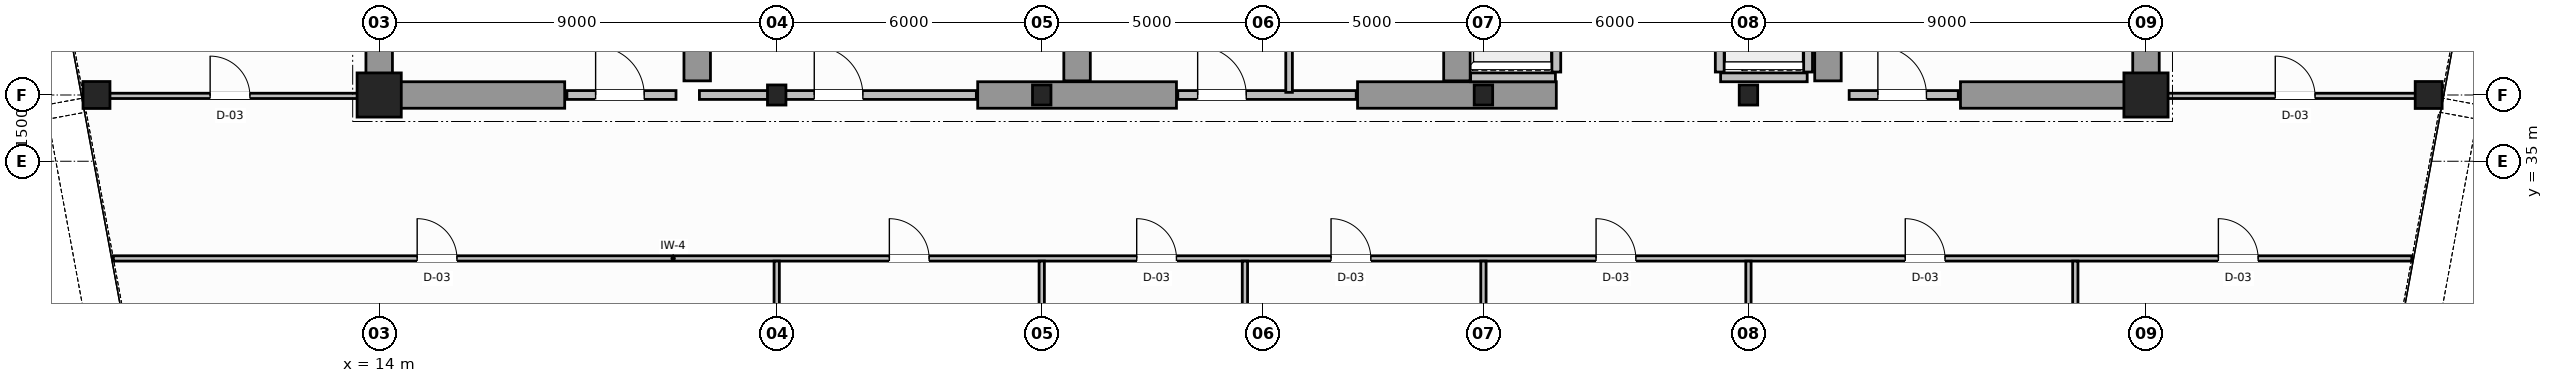
"""IFC4 building model, lengths in metres.
Left out: names, types, materials, properties, quantities, classifications, styles, units other than length and angle.
Written with IfcOpenShell. Run it as: python <this file> out.ifc"""

import sys

from ifc_helpers import new_model, si_unit, direction, frame, frame_2d, origin, origin_2d, place, context, subcontext, project, spatial, rectangle, hollow_circle, i_section, extrude, source, transform, mapped, element, fill, save


model = new_model("IFC4")
c1 = context("Model", 3, precision=1e-05, world=origin(), true_north=direction((0.0, 1.0)))
c2 = subcontext(c1, "Body", "Model", "MODEL_VIEW")
j1 = project(units=[si_unit("LENGTHUNIT", "METRE"), si_unit("PLANEANGLEUNIT", "RADIAN")], contexts=[c1])
p1 = place(None, origin())
s1 = spatial("IfcSite", under=j1, at=p1, CompositionType="ELEMENT")
p2 = place(p1, origin())
s2 = spatial("IfcBuilding", under=s1, at=p2, CompositionType="ELEMENT")
p3 = place(p2, frame((0.0, 0.0, 234.6)))
s3 = spatial("IfcBuildingStorey", under=s2, at=p3, CompositionType="ELEMENT", Elevation=234.6)
m1 = source(origin(), c2, "Body", "SweptSolid", [
    extrude(rectangle(XDim=1.0, YDim=1.0, at=origin_2d()), origin(), (0.0, 0.0, 1.0), 3.8),
])
p4 = place(p3, frame((14.0, 36.5, 0.0), z_axis=(0.0, 0.0, 1.0), x_axis=(1.0, 0.0, 0.0)))
e1 = element("IfcColumn", 1, at=p4, inside=s3, PredefinedType="COLUMN", context=c2, shape_type="MappedRepresentation", body=[
    mapped(m1, transform((0.0, 0.0, 0.0), scale=1.0)),
])
m2 = source(origin(), c2, "Body", "SweptSolid", [
    extrude(i_section(OverallWidth=0.418, OverallDepth=0.455, WebThickness=0.042, FlangeThickness=0.058, FilletRadius=0.015, at=origin_2d()), origin(), (0.0, 0.0, 1.0), 3.8),
])
for number, where, z_axis, x_axis in (
    (2, (23.0, 36.5, 0.0), (0.0, 0.0, 1.0), (1.0, 0.0, 0.0)),
    (3, (29.0, 36.5, 0.0), (0.0, 0.0, 1.0), (1.0, 0.0, 0.0)),
    (4, (39.0, 36.5, 0.0), (0.0, 0.0, 1.0), (1.0, 0.0, 0.0)),
    (5, (45.0, 36.5, 0.0), (0.0, 0.0, 1.0), (1.0, 0.0, 0.0)),
):
    element("IfcColumn", number, at=place(p3, frame(where, z_axis=z_axis, x_axis=x_axis)), inside=s3, PredefinedType="COLUMN", context=c2, shape_type="MappedRepresentation", body=[
        mapped(m2, transform((0.0, 0.0, 0.0), scale=1.0)),
    ])
p5 = place(p3, frame((54.0, 36.5, 0.0), z_axis=(0.0, 0.0, 1.0), x_axis=(1.0, 0.0, 0.0)))
e6 = element("IfcColumn", 6, at=p5, inside=s3, PredefinedType="COLUMN", context=c2, shape_type="MappedRepresentation", body=[
    mapped(m1, transform((0.0, 0.0, 0.0), scale=1.0)),
])
m3 = source(origin(), c2, "Body", "SweptSolid", [
    extrude(hollow_circle(Radius=0.305, WallThickness=0.03, at=origin_2d()), origin(), (0.0, 0.0, 1.0), 3.8),
])
for number, where, z_axis, x_axis in (
    (7, (7.6, 36.5, 0.0), (0.0, 0.0, 1.0), (1.0, 0.0, 0.0)),
    (8, (60.4, 36.5, 0.0), (0.0, 0.0, 1.0), (1.0, 0.0, 0.0)),
):
    element("IfcColumn", number, at=place(p3, frame(where, z_axis=z_axis, x_axis=x_axis)), inside=s3, PredefinedType="COLUMN", context=c2, shape_type="MappedRepresentation", body=[
        mapped(m3, transform((0.0, 0.0, 0.0), scale=1.0)),
    ])
for number, where, z_axis, x_axis in (
    (9, (14.0, 36.5, 0.0), (0.0, 0.0, 1.0), (0.0, 1.0, 0.0)),
    (10, (54.0, 36.5, 0.0), (0.0, 0.0, 1.0), (0.0, 1.0, 0.0)),
):
    element("IfcWall", number, at=place(p3, frame(where, z_axis=z_axis, x_axis=x_axis)), inside=s3, PredefinedType="SHEAR", context=c2, shape_type="SweptSolid", body=[
        extrude(rectangle(XDim=14.5, YDim=0.6, at=frame_2d((7.25, 0.0))), origin(), (0.0, 0.0, 1.0), 3.8),
    ])
p6 = place(p3, frame((14.32, 36.5, 0.0), z_axis=(0.0, 0.0, 1.0), x_axis=(1.0, 0.0, 0.0)))
e11 = element("IfcWall", 11, at=p6, inside=s3, PredefinedType="SHEAR", context=c2, shape_type="SweptSolid", body=[
    extrude(rectangle(XDim=3.88, YDim=0.6, at=frame_2d((1.94, 0.0))), origin(), (0.0, 0.0, 1.0), 2.58),
])
for number, where, z_axis, x_axis in (
    (12, (27.55, 36.5, 0.0), (0.0, 0.0, 1.0), (1.0, 0.0, 0.0)),
    (13, (36.15, 36.5, 0.0), (0.0, 0.0, 1.0), (1.0, 0.0, 0.0)),
):
    element("IfcWall", number, at=place(p3, frame(where, z_axis=z_axis, x_axis=x_axis)), inside=s3, PredefinedType="SHEAR", context=c2, shape_type="SweptSolid", body=[
        extrude(rectangle(XDim=4.5, YDim=0.6, at=frame_2d((2.25, 0.0))), origin(), (0.0, 0.0, 1.0), 3.8),
    ])
p7 = place(p3, frame((49.8, 36.5, 0.0), z_axis=(0.0, 0.0, 1.0), x_axis=(1.0, 0.0, 0.0)))
e14 = element("IfcWall", 14, at=p7, inside=s3, PredefinedType="SHEAR", context=c2, shape_type="SweptSolid", body=[
    extrude(rectangle(XDim=3.88, YDim=0.6, at=frame_2d((1.94, 0.0))), origin(), (0.0, 0.0, 1.0), 2.58),
])
for number, where, z_axis, x_axis in (
    (15, (21.2, 36.82, 0.0), (0.0, 0.0, 1.0), (0.0, 1.0, 0.0)),
    (16, (29.8, 36.82, 0.0), (0.0, 0.0, 1.0), (0.0, 1.0, 0.0)),
    (17, (38.4, 36.82, 0.0), (0.0, 0.0, 1.0), (0.0, 1.0, 0.0)),
    (18, (46.8, 36.82, 0.0), (0.0, 0.0, 1.0), (0.0, 1.0, 0.0)),
):
    element("IfcWall", number, at=place(p3, frame(where, z_axis=z_axis, x_axis=x_axis)), inside=s3, PredefinedType="SHEAR", context=c2, shape_type="SweptSolid", body=[
        extrude(rectangle(XDim=9.38, YDim=0.6, at=frame_2d((4.69, 0.0))), origin(), (0.0, 0.0, 1.0), 3.8),
    ])
p8 = place(p3, frame((18.25, 36.5, 0.0), z_axis=(0.0, 0.0, 1.0), x_axis=(1.0, 0.0, 0.0)))
e19 = element("IfcWall", 19, at=p8, inside=s3, PredefinedType="SOLIDWALL", context=c2, shape_type="SweptSolid", body=[
    extrude(rectangle(XDim=2.47, YDim=0.2, at=frame_2d((1.235, 0.0))), origin(), (0.0, 0.0, 1.0), 2.57),
])
p9 = place(p8, frame((0.65, 0.0, 0.0)))
e20 = element("IfcOpeningElement", 20, at=p9, cuts=e19, PredefinedType="OPENING", context=c2, shape_type="SweptSolid", body=[
    extrude(rectangle(XDim=1.1, YDim=2.15, at=frame_2d((0.55, 1.075))), frame((0.0, 0.11, 0.0), z_axis=(0.0, -1.0, 0.0), x_axis=(1.0, 0.0, 0.0)), (0.0, 0.0, 1.0), 0.22),
])
p10 = place(p3, frame((47.28, 36.5, 0.0), z_axis=(0.0, 0.0, 1.0), x_axis=(1.0, 0.0, 0.0)))
e21 = element("IfcWall", 21, at=p10, inside=s3, PredefinedType="SOLIDWALL", context=c2, shape_type="SweptSolid", body=[
    extrude(rectangle(XDim=2.47, YDim=0.2, at=frame_2d((1.235, 0.0))), origin(), (0.0, 0.0, 1.0), 2.57),
])
p11 = place(p10, frame((0.65, 0.0, 0.0)))
e22 = element("IfcOpeningElement", 22, at=p11, cuts=e21, PredefinedType="OPENING", context=c2, shape_type="SweptSolid", body=[
    extrude(rectangle(XDim=1.1, YDim=2.15, at=frame_2d((0.55, 1.075))), frame((0.0, 0.11, 0.0), z_axis=(0.0, -1.0, 0.0), x_axis=(1.0, 0.0, 0.0)), (0.0, 0.0, 1.0), 0.22),
])
p12 = place(p3, frame((38.71, 36.9, 0.0), z_axis=(0.0, 0.0, 1.0), x_axis=(1.0, 0.0, 0.0)))
e23 = element("IfcWall", 23, at=p12, inside=s3, PredefinedType="SOLIDWALL", context=c2, shape_type="SweptSolid", body=[
    extrude(rectangle(XDim=1.92, YDim=0.2, at=frame_2d((0.96, 0.0))), origin(), (0.0, 0.0, 1.0), 2.37),
])
p13 = place(p3, frame((40.65, 37.02, 0.0), z_axis=(0.0, 0.0, 1.0), x_axis=(0.0, 1.0, 0.0)))
e24 = element("IfcWall", 24, at=p13, inside=s3, PredefinedType="SOLIDWALL", context=c2, shape_type="SweptSolid", body=[
    extrude(rectangle(XDim=2.56, YDim=0.2, at=frame_2d((1.28, 0.0))), origin(), (0.0, 0.0, 1.0), 3.58),
])
p14 = place(p3, frame((44.37, 36.9, 0.0), z_axis=(0.0, 0.0, 1.0), x_axis=(1.0, 0.0, 0.0)))
e25 = element("IfcWall", 25, at=p14, inside=s3, PredefinedType="SOLIDWALL", context=c2, shape_type="SweptSolid", body=[
    extrude(rectangle(XDim=1.96, YDim=0.2, at=frame_2d((0.98, 0.0))), origin(), (0.0, 0.0, 1.0), 2.37),
])
for number, where, z_axis, x_axis in (
    (26, (44.35, 37.02, 0.0), (0.0, 0.0, 1.0), (0.0, 1.0, 0.0)),
    (27, (46.35, 37.02, 0.0), (0.0, 0.0, 1.0), (0.0, 1.0, 0.0)),
):
    element("IfcWall", number, at=place(p3, frame(where, z_axis=z_axis, x_axis=x_axis)), inside=s3, PredefinedType="SOLIDWALL", context=c2, shape_type="SweptSolid", body=[
        extrude(rectangle(XDim=2.56, YDim=0.2, at=frame_2d((1.28, 0.0))), origin(), (0.0, 0.0, 1.0), 3.58),
    ])
p15 = place(p3, frame((21.25, 36.5, 0.0), z_axis=(0.0, 0.0, 1.0), x_axis=(1.0, 0.0, 0.0)))
e28 = element("IfcWall", 28, at=p15, inside=s3, PredefinedType="SOLIDWALL", context=c2, shape_type="SweptSolid", body=[
    extrude(rectangle(XDim=6.27, YDim=0.2, at=frame_2d((3.135, 0.0))), origin(), (0.0, 0.0, 1.0), 2.37),
])
p16 = place(p15, frame((2.6, 0.0, 0.0)))
e29 = element("IfcOpeningElement", 29, at=p16, cuts=e28, PredefinedType="OPENING", context=c2, shape_type="SweptSolid", body=[
    extrude(rectangle(XDim=1.1, YDim=2.15, at=frame_2d((0.55, 1.075))), frame((0.0, 0.11, 0.0), z_axis=(0.0, -1.0, 0.0), x_axis=(1.0, 0.0, 0.0)), (0.0, 0.0, 1.0), 0.22),
])
p17 = place(p3, frame((32.08, 36.5, 0.0), z_axis=(0.0, 0.0, 1.0), x_axis=(1.0, 0.0, 0.0)))
e30 = element("IfcWall", 30, at=p17, inside=s3, PredefinedType="SOLIDWALL", context=c2, shape_type="SweptSolid", body=[
    extrude(rectangle(XDim=4.04, YDim=0.2, at=frame_2d((2.02, 0.0))), origin(), (0.0, 0.0, 1.0), 2.37),
])
p18 = place(p17, frame((0.45, 0.0, 0.0)))
e31 = element("IfcOpeningElement", 31, at=p18, cuts=e30, PredefinedType="OPENING", context=c2, shape_type="SweptSolid", body=[
    extrude(rectangle(XDim=1.1, YDim=2.15, at=frame_2d((0.55, 1.075))), frame((0.0, 0.11, 0.0), z_axis=(0.0, -1.0, 0.0), x_axis=(1.0, 0.0, 0.0)), (0.0, 0.0, 1.0), 0.22),
])
p19 = place(p3, frame((34.6, 36.56, 0.0), z_axis=(0.0, 0.0, 1.0), x_axis=(0.0, 1.0, 0.0)))
e32 = element("IfcWall", 32, at=p19, inside=s3, PredefinedType="PARTITIONING", context=c2, shape_type="SweptSolid", body=[
    extrude(rectangle(XDim=9.58, YDim=0.15, at=frame_2d((4.79, 0.0))), origin(), (0.0, 0.0, 1.0), 3.58),
])
p20 = place(p19, frame((4.2, 0.0, 0.0)))
e33 = element("IfcOpeningElement", 33, at=p20, cuts=e32, PredefinedType="OPENING", context=c2, shape_type="SweptSolid", body=[
    extrude(rectangle(XDim=0.9, YDim=2.1, at=frame_2d((0.45, 1.05))), frame((0.0, 0.085, 0.0), z_axis=(0.0, -1.0, 0.0), x_axis=(1.0, 0.0, 0.0)), (0.0, 0.0, 1.0), 0.17),
])
p21 = place(p3, frame((7.981, 32.8, 0.0), z_axis=(0.0, 0.0, 1.0), x_axis=(1.0, 0.0, 0.0)))
e34 = element("IfcWall", 34, at=p21, inside=s3, PredefinedType="PARTITIONING", context=c2, shape_type="SweptSolid", body=[
    extrude(rectangle(XDim=52.038, YDim=0.12, at=frame_2d((26.019, 0.0))), origin(), (0.0, 0.0, 1.0), 3.58),
])
p22 = place(p21, frame((6.879, 0.0, 0.0)))
e35 = element("IfcOpeningElement", 35, at=p22, cuts=e34, PredefinedType="OPENING", context=c2, shape_type="SweptSolid", body=[
    extrude(rectangle(XDim=0.9, YDim=2.15, at=frame_2d((0.45, 1.075))), frame((0.0, 0.07, 0.0), z_axis=(0.0, -1.0, 0.0), x_axis=(1.0, 0.0, 0.0)), (0.0, 0.0, 1.0), 0.14),
])
p23 = place(p21, frame((17.569, 0.0, 0.0)))
e36 = element("IfcOpeningElement", 36, at=p23, cuts=e34, PredefinedType="OPENING", context=c2, shape_type="SweptSolid", body=[
    extrude(rectangle(XDim=0.9, YDim=2.15, at=frame_2d((0.45, 1.075))), frame((0.0, 0.07, 0.0), z_axis=(0.0, -1.0, 0.0), x_axis=(1.0, 0.0, 0.0)), (0.0, 0.0, 1.0), 0.14),
])
p24 = place(p21, frame((23.169, 0.0, 0.0)))
e37 = element("IfcOpeningElement", 37, at=p24, cuts=e34, PredefinedType="OPENING", context=c2, shape_type="SweptSolid", body=[
    extrude(rectangle(XDim=0.9, YDim=2.15, at=frame_2d((0.45, 1.075))), frame((0.0, 0.07, 0.0), z_axis=(0.0, -1.0, 0.0), x_axis=(1.0, 0.0, 0.0)), (0.0, 0.0, 1.0), 0.14),
])
p25 = place(p21, frame((27.569, 0.0, 0.0)))
e38 = element("IfcOpeningElement", 38, at=p25, cuts=e34, PredefinedType="OPENING", context=c2, shape_type="SweptSolid", body=[
    extrude(rectangle(XDim=0.9, YDim=2.15, at=frame_2d((0.45, 1.075))), frame((0.0, 0.07, 0.0), z_axis=(0.0, -1.0, 0.0), x_axis=(1.0, 0.0, 0.0)), (0.0, 0.0, 1.0), 0.14),
])
p26 = place(p21, frame((33.569, 0.0, 0.0)))
e39 = element("IfcOpeningElement", 39, at=p26, cuts=e34, PredefinedType="OPENING", context=c2, shape_type="SweptSolid", body=[
    extrude(rectangle(XDim=0.9, YDim=2.15, at=frame_2d((0.45, 1.075))), frame((0.0, 0.07, 0.0), z_axis=(0.0, -1.0, 0.0), x_axis=(1.0, 0.0, 0.0)), (0.0, 0.0, 1.0), 0.14),
])
p27 = place(p21, frame((40.569, 0.0, 0.0)))
e40 = element("IfcOpeningElement", 40, at=p27, cuts=e34, PredefinedType="OPENING", context=c2, shape_type="SweptSolid", body=[
    extrude(rectangle(XDim=0.9, YDim=2.15, at=frame_2d((0.45, 1.075))), frame((0.0, 0.07, 0.0), z_axis=(0.0, -1.0, 0.0), x_axis=(1.0, 0.0, 0.0)), (0.0, 0.0, 1.0), 0.14),
])
p28 = place(p21, frame((47.658, 0.0, 0.0)))
e41 = element("IfcOpeningElement", 41, at=p28, cuts=e34, PredefinedType="OPENING", context=c2, shape_type="SweptSolid", body=[
    extrude(rectangle(XDim=0.9, YDim=2.15, at=frame_2d((0.45, 1.075))), frame((0.0, 0.07, 0.0), z_axis=(0.0, -1.0, 0.0), x_axis=(1.0, 0.0, 0.0)), (0.0, 0.0, 1.0), 0.14),
])
p29 = place(p3, frame((7.306, 36.48, 0.0), z_axis=(0.0, 0.0, 1.0), x_axis=(1.0, 0.0, 0.0)))
e42 = element("IfcWall", 42, at=p29, inside=s3, PredefinedType="PARTITIONING", context=c2, shape_type="SweptSolid", body=[
    extrude(rectangle(XDim=6.634, YDim=0.12, at=frame_2d((3.317, 0.0))), origin(), (0.0, 0.0, 1.0), 2.37),
])
p30 = place(p29, frame((2.867, 0.0, 0.0)))
e43 = element("IfcOpeningElement", 43, at=p30, cuts=e42, PredefinedType="OPENING", context=c2, shape_type="SweptSolid", body=[
    extrude(rectangle(XDim=0.9, YDim=2.15, at=frame_2d((0.45, 1.075))), frame((0.0, 0.07, 0.0), z_axis=(0.0, -1.0, 0.0), x_axis=(1.0, 0.0, 0.0)), (0.0, 0.0, 1.0), 0.14),
])
p31 = place(p3, frame((54.06, 36.48, 0.0), z_axis=(0.0, 0.0, 1.0), x_axis=(1.0, 0.0, 0.0)))
e44 = element("IfcWall", 44, at=p31, inside=s3, PredefinedType="PARTITIONING", context=c2, shape_type="SweptSolid", body=[
    extrude(rectangle(XDim=6.634, YDim=0.12, at=frame_2d((3.317, 0.0))), origin(), (0.0, 0.0, 1.0), 2.37),
])
p32 = place(p31, frame((2.867, 0.0, 0.0)))
e45 = element("IfcOpeningElement", 45, at=p32, cuts=e44, PredefinedType="OPENING", context=c2, shape_type="SweptSolid", body=[
    extrude(rectangle(XDim=0.9, YDim=2.15, at=frame_2d((0.45, 1.075))), frame((0.0, 0.07, 0.0), z_axis=(0.0, -1.0, 0.0), x_axis=(1.0, 0.0, 0.0)), (0.0, 0.0, 1.0), 0.14),
])
for number, where, z_axis, x_axis in (
    (46, (23.0, 28.14, 0.0), (0.0, 0.0, 1.0), (0.0, 1.0, 0.0)),
    (47, (29.0, 28.14, 0.0), (0.0, 0.0, 1.0), (0.0, 1.0, 0.0)),
    (48, (39.0, 28.14, 0.0), (0.0, 0.0, 1.0), (0.0, 1.0, 0.0)),
    (49, (45.0, 28.14, 0.0), (0.0, 0.0, 1.0), (0.0, 1.0, 0.0)),
):
    element("IfcWall", number, at=place(p3, frame(where, z_axis=z_axis, x_axis=x_axis)), inside=s3, PredefinedType="PARTITIONING", context=c2, shape_type="SweptSolid", body=[
        extrude(rectangle(XDim=4.6, YDim=0.12, at=frame_2d((2.3, 0.0))), origin(), (0.0, 0.0, 1.0), 2.37),
    ])
p33 = place(p3, frame((33.6, 13.24, 0.0), z_axis=(0.0, 0.0, 1.0), x_axis=(0.0, 1.0, 0.0)))
e50 = element("IfcWall", 50, at=p33, inside=s3, PredefinedType="PARTITIONING", context=c2, shape_type="SweptSolid", body=[
    extrude(rectangle(XDim=19.5, YDim=0.12, at=frame_2d((9.75, 0.0))), origin(), (0.0, 0.0, 1.0), 3.58),
])
p34 = place(p3, frame((52.4, 18.64, 0.0), z_axis=(0.0, 0.0, 1.0), x_axis=(0.0, 1.0, 0.0)))
e51 = element("IfcWall", 51, at=p34, inside=s3, PredefinedType="PARTITIONING", context=c2, shape_type="SweptSolid", body=[
    extrude(rectangle(XDim=14.1, YDim=0.12, at=frame_2d((7.05, 0.0))), origin(), (0.0, 0.0, 1.0), 3.58),
])
m4 = source(origin(), c2, "Body", "SweptSolid", [
    extrude(rectangle(XDim=1.1, YDim=2.15, at=frame_2d((0.55, 1.075))), frame((0.0, 0.025, 0.0), z_axis=(0.0, -1.0, 0.0), x_axis=(1.0, 0.0, 0.0)), (0.0, 0.0, 1.0), 0.05),
])
p35 = place(p9, origin())
e52 = element("IfcDoor", 52, at=p35, inside=s3, OperationType="SINGLE_SWING_RIGHT", PredefinedType="DOOR", context=c2, shape_type="MappedRepresentation", body=[
    mapped(m4, transform((0.0, 0.0, 0.0), scale=1.0)),
])
fill(e20, e52)
p36 = place(p11, origin())
e53 = element("IfcDoor", 53, at=p36, inside=s3, OperationType="SINGLE_SWING_LEFT", PredefinedType="DOOR", context=c2, shape_type="MappedRepresentation", body=[
    mapped(m4, transform((0.0, 0.0, 0.0), scale=1.0)),
])
fill(e22, e53)
p37 = place(p16, origin())
e54 = element("IfcDoor", 54, at=p37, inside=s3, OperationType="SINGLE_SWING_LEFT", PredefinedType="DOOR", context=c2, shape_type="MappedRepresentation", body=[
    mapped(m4, transform((0.0, 0.0, 0.0), scale=1.0)),
])
fill(e29, e54)
p38 = place(p18, origin())
e55 = element("IfcDoor", 55, at=p38, inside=s3, OperationType="SINGLE_SWING_LEFT", PredefinedType="DOOR", context=c2, shape_type="MappedRepresentation", body=[
    mapped(m4, transform((0.0, 0.0, 0.0), scale=1.0)),
])
fill(e31, e55)
m5 = source(origin(), c2, "Body", "SweptSolid", [
    extrude(rectangle(XDim=0.9, YDim=2.15, at=frame_2d((0.45, 1.075))), frame((0.0, 0.025, 0.0), z_axis=(0.0, -1.0, 0.0), x_axis=(1.0, 0.0, 0.0)), (0.0, 0.0, 1.0), 0.05),
])
p39 = place(p30, origin())
e56 = element("IfcDoor", 56, at=p39, inside=s3, OperationType="SINGLE_SWING_LEFT", PredefinedType="DOOR", context=c2, shape_type="MappedRepresentation", body=[
    mapped(m5, transform((0.0, 0.0, 0.0), scale=1.0)),
])
fill(e43, e56)
p40 = place(p32, origin())
e57 = element("IfcDoor", 57, at=p40, inside=s3, OperationType="SINGLE_SWING_RIGHT", PredefinedType="DOOR", context=c2, shape_type="MappedRepresentation", body=[
    mapped(m5, transform((0.0, 0.0, 0.0), scale=1.0)),
])
fill(e45, e57)
p41 = place(p22, origin())
e58 = element("IfcDoor", 58, at=p41, inside=s3, OperationType="SINGLE_SWING_LEFT", PredefinedType="DOOR", context=c2, shape_type="MappedRepresentation", body=[
    mapped(m5, transform((0.0, 0.0, 0.0), scale=1.0)),
])
fill(e35, e58)
p42 = place(p23, origin())
e59 = element("IfcDoor", 59, at=p42, inside=s3, OperationType="SINGLE_SWING_RIGHT", PredefinedType="DOOR", context=c2, shape_type="MappedRepresentation", body=[
    mapped(m5, transform((0.0, 0.0, 0.0), scale=1.0)),
])
fill(e36, e59)
p43 = place(p24, origin())
e60 = element("IfcDoor", 60, at=p43, inside=s3, OperationType="SINGLE_SWING_LEFT", PredefinedType="DOOR", context=c2, shape_type="MappedRepresentation", body=[
    mapped(m5, transform((0.0, 0.0, 0.0), scale=1.0)),
])
fill(e37, e60)
p44 = place(p25, origin())
e61 = element("IfcDoor", 61, at=p44, inside=s3, OperationType="SINGLE_SWING_RIGHT", PredefinedType="DOOR", context=c2, shape_type="MappedRepresentation", body=[
    mapped(m5, transform((0.0, 0.0, 0.0), scale=1.0)),
])
fill(e38, e61)
p45 = place(p26, origin())
e62 = element("IfcDoor", 62, at=p45, inside=s3, OperationType="SINGLE_SWING_LEFT", PredefinedType="DOOR", context=c2, shape_type="MappedRepresentation", body=[
    mapped(m5, transform((0.0, 0.0, 0.0), scale=1.0)),
])
fill(e39, e62)
p46 = place(p27, origin())
e63 = element("IfcDoor", 63, at=p46, inside=s3, OperationType="SINGLE_SWING_RIGHT", PredefinedType="DOOR", context=c2, shape_type="MappedRepresentation", body=[
    mapped(m5, transform((0.0, 0.0, 0.0), scale=1.0)),
])
fill(e40, e63)
p47 = place(p28, origin())
e64 = element("IfcDoor", 64, at=p47, inside=s3, OperationType="SINGLE_SWING_LEFT", PredefinedType="DOOR", context=c2, shape_type="MappedRepresentation", body=[
    mapped(m5, transform((0.0, 0.0, 0.0), scale=1.0)),
])
fill(e41, e64)
save(model, sys.argv[1])
